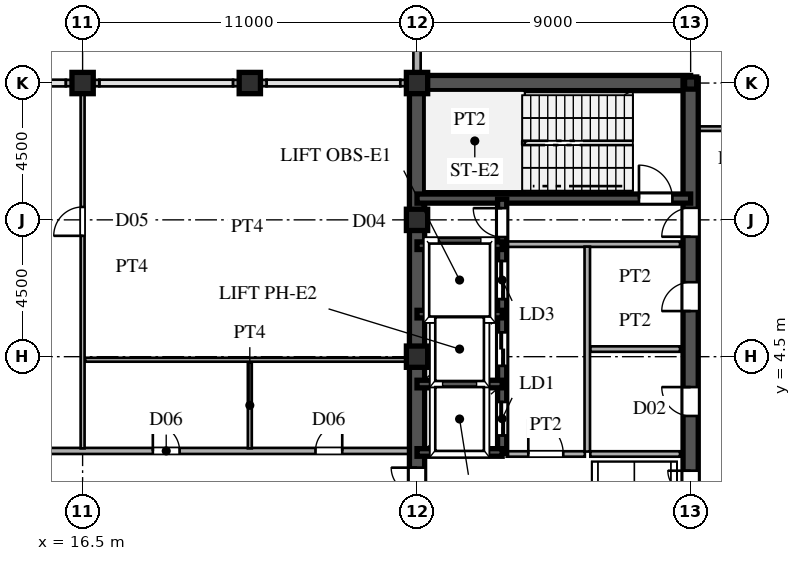
"""IFC4 building model, lengths in metres.
Left out: names, types, materials, properties, quantities, classifications, styles, units other than length and angle.
Written with IfcOpenShell. Run it as: python <this file> out.ifc"""

import sys

from ifc_helpers import new_model, si_unit, direction, frame, frame_2d, origin, origin_2d, place, context, subcontext, project, spatial, rectangle, hollow_rectangle, i_section, extrude, source, transform, mapped, element, fill, save


model = new_model("IFC4")
c1 = context("Model", 3, precision=1e-05, world=origin(), true_north=direction((0.0, 1.0)))
c2 = subcontext(c1, "Body", "Model", "MODEL_VIEW")
j1 = project(units=[si_unit("LENGTHUNIT", "METRE"), si_unit("PLANEANGLEUNIT", "RADIAN")], contexts=[c1])
p1 = place(None, origin())
s1 = spatial("IfcSite", under=j1, at=p1, CompositionType="ELEMENT")
p2 = place(p1, origin())
s2 = spatial("IfcBuilding", under=s1, at=p2, CompositionType="ELEMENT")
p3 = place(p2, frame((0.0, 0.0, 269.4)))
s3 = spatial("IfcBuildingStorey", under=s2, at=p3, CompositionType="ELEMENT", Elevation=269.4)
m1 = source(origin(), c2, "Body", "SweptSolid", [
    extrude(hollow_rectangle(XDim=0.7, YDim=0.7, WallThickness=0.03, at=origin_2d()), origin(), (0.0, 0.0, 1.0), 4.8),
])
for number, where, z_axis, x_axis in (
    (1, (27.5, 4.5, 0.0), (0.0, 0.0, 1.0), (1.0, 0.0, 0.0)),
    (2, (27.5, 9.0, 0.0), (0.0, 0.0, 1.0), (1.0, 0.0, 0.0)),
    (3, (27.5, 13.5, 0.0), (0.0, 0.0, 1.0), (1.0, 0.0, 0.0)),
):
    element("IfcColumn", number, at=place(p3, frame(where, z_axis=z_axis, x_axis=x_axis)), inside=s3, PredefinedType="COLUMN", context=c2, shape_type="MappedRepresentation", body=[
        mapped(m1, transform((0.0, 0.0, 0.0), scale=1.0)),
    ])
m2 = source(origin(), c2, "Body", "SweptSolid", [
    extrude(i_section(OverallWidth=0.4, OverallDepth=0.4, WebThickness=0.013, FlangeThickness=0.021, at=origin_2d()), origin(), (0.0, 0.0, 1.0), 4.8),
])
p4 = place(p3, frame((36.5, 13.5, 0.0), z_axis=(0.0, 0.0, 1.0), x_axis=(1.0, 0.0, 0.0)))
e4 = element("IfcColumn", 4, at=p4, inside=s3, PredefinedType="COLUMN", context=c2, shape_type="MappedRepresentation", body=[
    mapped(m2, transform((0.0, 0.0, 0.0), scale=1.0)),
])
for number, where, z_axis, x_axis in (
    (5, (16.5, 13.5, 0.0), (0.0, 0.0, 1.0), (1.0, 0.0, 0.0)),
    (6, (22.0, 13.5, 0.0), (0.0, 0.0, 1.0), (1.0, 0.0, 0.0)),
):
    element("IfcColumn", number, at=place(p3, frame(where, z_axis=z_axis, x_axis=x_axis)), inside=s3, PredefinedType="COLUMN", context=c2, shape_type="MappedRepresentation", body=[
        mapped(m1, transform((0.0, 0.0, 0.0), scale=1.0)),
    ])
p5 = place(p3, frame((27.5, 13.755, 0.0), z_axis=(0.0, 0.0, 1.0), x_axis=(0.0, 1.0, 0.0)))
e7 = element("IfcWall", 7, at=p5, inside=s3, PredefinedType="SOLIDWALL", context=c2, shape_type="SweptSolid", body=[
    extrude(rectangle(XDim=0.62, YDim=0.24, at=frame_2d((0.31, 0.0))), origin(), (0.0, 0.0, 1.0), 4.04),
])
p6 = place(p3, frame((27.5, 14.375, 0.0), z_axis=(0.0, 0.0, 1.0), x_axis=(0.0, 1.0, 0.0)))
e8 = element("IfcWall", 8, at=p6, inside=s3, PredefinedType="SOLIDWALL", context=c2, shape_type="SweptSolid", body=[
    extrude(rectangle(XDim=1.605, YDim=0.24, at=frame_2d((0.803, 0.0))), origin(), (0.0, 0.0, 1.0), 4.54),
])
for number, where, z_axis, x_axis in (
    (9, (15.95, 13.5, 0.0), (0.0, 0.0, 1.0), (1.0, 0.0, 0.0)),
    (10, (21.45, 13.5, 0.0), (0.0, 0.0, 1.0), (1.0, 0.0, 0.0)),
):
    element("IfcWall", number, at=place(p3, frame(where, z_axis=z_axis, x_axis=x_axis)), inside=s3, PredefinedType="SOLIDWALL", context=c2, shape_type="SweptSolid", body=[
        extrude(rectangle(XDim=1.1, YDim=0.21, at=frame_2d((0.55, 0.0))), origin(), (0.0, 0.0, 1.0), 4.04),
    ])
p7 = place(p3, frame((26.95, 13.5, 0.0), z_axis=(0.0, 0.0, 1.0), x_axis=(1.0, 0.0, 0.0)))
e11 = element("IfcWall", 11, at=p7, inside=s3, PredefinedType="SOLIDWALL", context=c2, shape_type="SweptSolid", body=[
    extrude(rectangle(XDim=0.54, YDim=0.21, at=frame_2d((0.27, 0.0))), origin(), (0.0, 0.0, 1.0), 4.04),
])
p8 = place(p3, frame((27.5, 1.3, 0.0), z_axis=(0.0, 0.0, 1.0), x_axis=(0.0, 1.0, 0.0)))
e12 = element("IfcWall", 12, at=p8, inside=s3, PredefinedType="SHEAR", context=c2, shape_type="SweptSolid", body=[
    extrude(rectangle(XDim=12.2, YDim=0.5, at=frame_2d((6.1, 0.0))), origin(), (0.0, 0.0, 1.0), 4.54),
])
p9 = place(p3, frame((27.5, -1.3, 0.0), z_axis=(0.0, 0.0, 1.0), x_axis=(0.0, 1.0, 0.0)))
e13 = element("IfcWall", 13, at=p9, inside=s3, PredefinedType="SHEAR", context=c2, shape_type="SweptSolid", body=[
    extrude(rectangle(XDim=2.6, YDim=0.5, at=frame_2d((1.3, 0.0))), origin(), (0.0, 0.0, 1.0), 4.54),
])
p10 = place(p9, frame((0.45, 0.0, 0.0)))
e14 = element("IfcOpeningElement", 14, at=p10, cuts=e13, PredefinedType="OPENING", context=c2, shape_type="SweptSolid", body=[
    extrude(rectangle(XDim=1.7, YDim=2.35, at=frame_2d((0.85, 1.175))), frame((0.0, 0.26, 0.0), z_axis=(0.0, -1.0, 0.0), x_axis=(1.0, 0.0, 0.0)), (0.0, 0.0, 1.0), 0.52),
])
p11 = place(p3, frame((27.5, 13.5, 0.0), z_axis=(0.0, 0.0, 1.0), x_axis=(1.0, 0.0, 0.0)))
e15 = element("IfcWall", 15, at=p11, inside=s3, PredefinedType="SHEAR", context=c2, shape_type="SweptSolid", body=[
    extrude(rectangle(XDim=9.0, YDim=0.5, at=frame_2d((4.5, 0.0))), origin(), (0.0, 0.0, 1.0), 4.54),
])
p12 = place(p3, frame((36.5, -1.3, 0.0), z_axis=(0.0, 0.0, 1.0), x_axis=(0.0, 1.0, 0.0)))
e16 = element("IfcWall", 16, at=p12, inside=s3, PredefinedType="SHEAR", context=c2, shape_type="SweptSolid", body=[
    extrude(rectangle(XDim=2.6, YDim=0.5, at=frame_2d((1.3, 0.0))), origin(), (0.0, 0.0, 1.0), 4.54),
])
p13 = place(p12, frame((0.55, 0.0, 0.0)))
e17 = element("IfcOpeningElement", 17, at=p13, cuts=e16, PredefinedType="OPENING", context=c2, shape_type="SweptSolid", body=[
    extrude(rectangle(XDim=1.5, YDim=2.3, at=frame_2d((0.75, 1.15))), frame((0.0, 0.26, 0.0), z_axis=(0.0, -1.0, 0.0), x_axis=(1.0, 0.0, 0.0)), (0.0, 0.0, 1.0), 0.52),
])
p14 = place(p3, frame((36.5, 8.2, 0.0), z_axis=(0.0, 0.0, 1.0), x_axis=(0.0, 1.0, 0.0)))
e18 = element("IfcWall", 18, at=p14, inside=s3, PredefinedType="SHEAR", context=c2, shape_type="SweptSolid", body=[
    extrude(rectangle(XDim=5.45, YDim=0.5, at=frame_2d((2.725, 0.0))), origin(), (0.0, 0.0, 1.0), 4.54),
])
p15 = place(p14, frame((0.245, 0.0, 0.0)))
e19 = element("IfcOpeningElement", 19, at=p15, cuts=e18, PredefinedType="OPENING", context=c2, shape_type="SweptSolid", body=[
    extrude(rectangle(XDim=0.95, YDim=2.15, at=frame_2d((0.475, 1.075))), frame((0.0, 0.26, 0.0), z_axis=(0.0, -1.0, 0.0), x_axis=(1.0, 0.0, 0.0)), (0.0, 0.0, 1.0), 0.52),
])
p16 = place(p3, frame((36.5, 1.3, 0.0), z_axis=(0.0, 0.0, 1.0), x_axis=(0.0, 1.0, 0.0)))
e20 = element("IfcWall", 20, at=p16, inside=s3, PredefinedType="SHEAR", context=c2, shape_type="SweptSolid", body=[
    extrude(rectangle(XDim=3.45, YDim=0.5, at=frame_2d((1.725, 0.0))), origin(), (0.0, 0.0, 1.0), 4.54),
])
p17 = place(p16, frame((1.25, 0.0, 0.0)))
e21 = element("IfcOpeningElement", 21, at=p17, cuts=e20, PredefinedType="OPENING", context=c2, shape_type="SweptSolid", body=[
    extrude(rectangle(XDim=0.95, YDim=2.15, at=frame_2d((0.475, 1.075))), frame((0.0, 0.26, 0.0), z_axis=(0.0, -1.0, 0.0), x_axis=(1.0, 0.0, 0.0)), (0.0, 0.0, 1.0), 0.52),
])
p18 = place(p3, frame((36.5, 4.75, 0.0), z_axis=(0.0, 0.0, 1.0), x_axis=(0.0, 1.0, 0.0)))
e22 = element("IfcWall", 22, at=p18, inside=s3, PredefinedType="SHEAR", context=c2, shape_type="SweptSolid", body=[
    extrude(rectangle(XDim=3.45, YDim=0.5, at=frame_2d((1.725, 0.0))), origin(), (0.0, 0.0, 1.0), 4.54),
])
p19 = place(p18, frame((1.25, 0.0, 0.0)))
e23 = element("IfcOpeningElement", 23, at=p19, cuts=e22, PredefinedType="OPENING", context=c2, shape_type="SweptSolid", body=[
    extrude(rectangle(XDim=0.95, YDim=2.15, at=frame_2d((0.475, 1.075))), frame((0.0, 0.26, 0.0), z_axis=(0.0, -1.0, 0.0), x_axis=(1.0, 0.0, 0.0)), (0.0, 0.0, 1.0), 0.52),
])
p20 = place(p3, frame((27.5, 9.7, 0.0), z_axis=(0.0, 0.0, 1.0), x_axis=(1.0, 0.0, 0.0)))
e24 = element("IfcWall", 24, at=p20, inside=s3, PredefinedType="SHEAR", context=c2, shape_type="SweptSolid", body=[
    extrude(rectangle(XDim=9.0, YDim=0.3, at=frame_2d((4.5, 0.0))), origin(), (0.0, 0.0, 1.0), 4.54),
])
p21 = place(p20, frame((7.3, 0.0, 0.0)))
e25 = element("IfcOpeningElement", 25, at=p21, cuts=e24, PredefinedType="OPENING", context=c2, shape_type="SweptSolid", body=[
    extrude(rectangle(XDim=1.1, YDim=2.2, at=frame_2d((0.55, 1.1))), frame((0.0, 0.16, 0.0), z_axis=(0.0, -1.0, 0.0), x_axis=(1.0, 0.0, 0.0)), (0.0, 0.0, 1.0), 0.32),
])
for number, where, z_axis, x_axis in (
    (26, (27.5, 1.35, 0.0), (0.0, 0.0, 1.0), (1.0, 0.0, 0.0)),
    (27, (27.5, 3.6, 0.0), (0.0, 0.0, 1.0), (1.0, 0.0, 0.0)),
    (28, (27.5, 5.9, 0.0), (0.0, 0.0, 1.0), (1.0, 0.0, 0.0)),
    (29, (27.5, 8.15, 0.0), (0.0, 0.0, 1.0), (1.0, 0.0, 0.0)),
):
    element("IfcWall", number, at=place(p3, frame(where, z_axis=z_axis, x_axis=x_axis)), inside=s3, PredefinedType="SHEAR", context=c2, shape_type="SweptSolid", body=[
        extrude(rectangle(XDim=2.8, YDim=0.25, at=frame_2d((1.4, 0.0))), origin(), (0.0, 0.0, 1.0), 4.54),
    ])
p22 = place(p3, frame((30.3, 1.32, 0.0), z_axis=(0.0, 0.0, 1.0), x_axis=(0.0, 1.0, 0.0)))
e30 = element("IfcWall", 30, at=p22, inside=s3, PredefinedType="SHEAR", context=c2, shape_type="SweptSolid", body=[
    extrude(rectangle(XDim=2.28, YDim=0.3, at=frame_2d((1.14, 0.0))), origin(), (0.0, 0.0, 1.0), 4.54),
])
p23 = place(p22, frame((0.59, 0.0, 0.0)))
e31 = element("IfcOpeningElement", 31, at=p23, cuts=e30, PredefinedType="OPENING", context=c2, shape_type="SweptSolid", body=[
    extrude(rectangle(XDim=1.1, YDim=2.2, at=frame_2d((0.55, 1.1))), frame((0.0, 0.16, 0.0), z_axis=(0.0, -1.0, 0.0), x_axis=(1.0, 0.0, 0.0)), (0.0, 0.0, 1.0), 0.32),
])
p24 = place(p3, frame((30.3, 3.6, 0.0), z_axis=(0.0, 0.0, 1.0), x_axis=(0.0, 1.0, 0.0)))
e32 = element("IfcWall", 32, at=p24, inside=s3, PredefinedType="SHEAR", context=c2, shape_type="SweptSolid", body=[
    extrude(rectangle(XDim=2.3, YDim=0.3, at=frame_2d((1.15, 0.0))), origin(), (0.0, 0.0, 1.0), 4.54),
])
p25 = place(p24, frame((0.6, 0.0, 0.0)))
e33 = element("IfcOpeningElement", 33, at=p25, cuts=e32, PredefinedType="OPENING", context=c2, shape_type="SweptSolid", body=[
    extrude(rectangle(XDim=1.1, YDim=2.2, at=frame_2d((0.55, 1.1))), frame((0.0, 0.16, 0.0), z_axis=(0.0, -1.0, 0.0), x_axis=(1.0, 0.0, 0.0)), (0.0, 0.0, 1.0), 0.32),
])
p26 = place(p3, frame((30.3, 5.9, 0.0), z_axis=(0.0, 0.0, 1.0), x_axis=(0.0, 1.0, 0.0)))
e34 = element("IfcWall", 34, at=p26, inside=s3, PredefinedType="SHEAR", context=c2, shape_type="SweptSolid", body=[
    extrude(rectangle(XDim=2.25, YDim=0.3, at=frame_2d((1.125, 0.0))), origin(), (0.0, 0.0, 1.0), 4.54),
])
p27 = place(p26, frame((0.495, 0.0, 0.0)))
e35 = element("IfcOpeningElement", 35, at=p27, cuts=e34, PredefinedType="OPENING", context=c2, shape_type="SweptSolid", body=[
    extrude(rectangle(XDim=1.25, YDim=2.3, at=frame_2d((0.625, 1.15))), frame((0.0, 0.16, 0.0), z_axis=(0.0, -1.0, 0.0), x_axis=(1.0, 0.0, 0.0)), (0.0, 0.0, 1.0), 0.32),
])
p28 = place(p3, frame((30.3, 8.15, 0.0), z_axis=(0.0, 0.0, 1.0), x_axis=(0.0, 1.0, 0.0)))
e36 = element("IfcWall", 36, at=p28, inside=s3, PredefinedType="SHEAR", context=c2, shape_type="SweptSolid", body=[
    extrude(rectangle(XDim=1.53, YDim=0.3, at=frame_2d((0.765, 0.0))), origin(), (0.0, 0.0, 1.0), 4.54),
])
p29 = place(p28, frame((0.285, 0.0, 0.0)))
e37 = element("IfcOpeningElement", 37, at=p29, cuts=e36, PredefinedType="OPENING", context=c2, shape_type="SweptSolid", body=[
    extrude(rectangle(XDim=0.95, YDim=2.15, at=frame_2d((0.475, 1.075))), frame((0.0, 0.16, 0.0), z_axis=(0.0, -1.0, 0.0), x_axis=(1.0, 0.0, 0.0)), (0.0, 0.0, 1.0), 0.32),
])
p30 = place(p3, frame((30.45, 8.2, 0.0), z_axis=(0.0, 0.0, 1.0), x_axis=(1.0, 0.0, 0.0)))
e38 = element("IfcWall", 38, at=p30, inside=s3, PredefinedType="PARTITIONING", context=c2, shape_type="SweptSolid", body=[
    extrude(rectangle(XDim=5.7, YDim=0.18, at=frame_2d((2.85, 0.0))), origin(), (0.0, 0.0, 1.0), 4.54),
])
p31 = place(p3, frame((33.1, 1.38, 0.0), z_axis=(0.0, 0.0, 1.0), x_axis=(0.0, 1.0, 0.0)))
e39 = element("IfcWall", 39, at=p31, inside=s3, PredefinedType="PARTITIONING", context=c2, shape_type="SweptSolid", body=[
    extrude(rectangle(XDim=6.74, YDim=0.18, at=frame_2d((3.37, 0.0))), origin(), (0.0, 0.0, 1.0), 4.54),
])
p32 = place(p3, frame((30.45, 1.3, 0.0), z_axis=(0.0, 0.0, 1.0), x_axis=(1.0, 0.0, 0.0)))
e40 = element("IfcWall", 40, at=p32, inside=s3, PredefinedType="PARTITIONING", context=c2, shape_type="SweptSolid", body=[
    extrude(rectangle(XDim=2.57, YDim=0.18, at=frame_2d((1.285, 0.0))), origin(), (0.0, 0.0, 1.0), 4.54),
])
p33 = place(p32, frame((0.71, 0.0, 0.0)))
e41 = element("IfcOpeningElement", 41, at=p33, cuts=e40, PredefinedType="OPENING", context=c2, shape_type="SweptSolid", body=[
    extrude(rectangle(XDim=1.15, YDim=2.2, at=frame_2d((0.575, 1.1))), frame((0.0, 0.1, 0.0), z_axis=(0.0, -1.0, 0.0), x_axis=(1.0, 0.0, 0.0)), (0.0, 0.0, 1.0), 0.2),
])
for number, where, z_axis, x_axis in (
    (42, (33.2, 1.3, 0.0), (0.0, 0.0, 1.0), (1.0, 0.0, 0.0)),
    (43, (33.2, 4.75, 0.0), (0.0, 0.0, 1.0), (1.0, 0.0, 0.0)),
):
    element("IfcWall", number, at=place(p3, frame(where, z_axis=z_axis, x_axis=x_axis)), inside=s3, PredefinedType="PARTITIONING", context=c2, shape_type="SweptSolid", body=[
        extrude(rectangle(XDim=2.95, YDim=0.18, at=frame_2d((1.475, 0.0))), origin(), (0.0, 0.0, 1.0), 4.54),
    ])
p34 = place(p3, frame((-27.245, 1.4, 0.0), z_axis=(0.0, 0.0, 1.0), x_axis=(1.0, 0.0, 0.0)))
e44 = element("IfcWall", 44, at=p34, inside=s3, PredefinedType="PARTITIONING", context=c2, shape_type="SweptSolid", body=[
    extrude(rectangle(XDim=54.49, YDim=0.2, at=frame_2d((27.245, 0.0))), origin(), (0.0, 0.0, 1.0), 4.54),
])
p35 = place(p34, frame((17.67, 0.0, 0.0)))
e45 = element("IfcOpeningElement", 45, at=p35, cuts=e44, PredefinedType="OPENING", context=c2, shape_type="SweptSolid", body=[
    extrude(rectangle(XDim=1.15, YDim=2.2, at=frame_2d((0.575, 1.1))), frame((0.0, 0.11, 0.0), z_axis=(0.0, -1.0, 0.0), x_axis=(1.0, 0.0, 0.0)), (0.0, 0.0, 1.0), 0.22),
])
p36 = place(p34, frame((46.055, 0.0, 0.0)))
e46 = element("IfcOpeningElement", 46, at=p36, cuts=e44, PredefinedType="OPENING", context=c2, shape_type="SweptSolid", body=[
    extrude(rectangle(XDim=0.88, YDim=2.1, at=frame_2d((0.44, 1.05))), frame((0.0, 0.11, 0.0), z_axis=(0.0, -1.0, 0.0), x_axis=(1.0, 0.0, 0.0)), (0.0, 0.0, 1.0), 0.22),
])
p37 = place(p34, frame((51.405, 0.0, 0.0)))
e47 = element("IfcOpeningElement", 47, at=p37, cuts=e44, PredefinedType="OPENING", context=c2, shape_type="SweptSolid", body=[
    extrude(rectangle(XDim=0.88, YDim=2.1, at=frame_2d((0.44, 1.05))), frame((0.0, 0.11, 0.0), z_axis=(0.0, -1.0, 0.0), x_axis=(1.0, 0.0, 0.0)), (0.0, 0.0, 1.0), 0.22),
])
p38 = place(p3, frame((16.585, 4.4, 0.0), z_axis=(0.0, 0.0, 1.0), x_axis=(1.0, 0.0, 0.0)))
e48 = element("IfcWall", 48, at=p38, inside=s3, PredefinedType="PARTITIONING", context=c2, shape_type="SweptSolid", body=[
    extrude(rectangle(XDim=10.66, YDim=0.13, at=frame_2d((5.33, 0.0))), origin(), (0.0, 0.0, 1.0), 4.54),
])
p39 = place(p3, frame((36.755, 12.0, 0.0), z_axis=(0.0, 0.0, 1.0), x_axis=(1.0, 0.0, 0.0)))
e49 = element("IfcWall", 49, at=p39, inside=s3, PredefinedType="PARTITIONING", context=c2, shape_type="SweptSolid", body=[
    extrude(rectangle(XDim=2.36, YDim=0.15, at=frame_2d((1.18, 0.0))), origin(), (0.0, 0.0, 1.0), 4.54),
])
p40 = place(p3, frame((16.5, 1.485, 0.0), z_axis=(0.0, 0.0, 1.0), x_axis=(0.0, 1.0, 0.0)))
e50 = element("IfcWall", 50, at=p40, inside=s3, PredefinedType="PARTITIONING", context=c2, shape_type="SweptSolid", body=[
    extrude(rectangle(XDim=11.905, YDim=0.13, at=frame_2d((5.952, 0.0))), origin(), (0.0, 0.0, 1.0), 3.24),
])
p41 = place(p40, frame((6.99, 0.0, 0.0)))
e51 = element("IfcOpeningElement", 51, at=p41, cuts=e50, PredefinedType="OPENING", context=c2, shape_type="SweptSolid", body=[
    extrude(rectangle(XDim=0.95, YDim=2.15, at=frame_2d((0.475, 1.075))), frame((0.0, 0.075, 0.0), z_axis=(0.0, -1.0, 0.0), x_axis=(1.0, 0.0, 0.0)), (0.0, 0.0, 1.0), 0.15),
])
p42 = place(p3, frame((22.0, 1.485, 0.0), z_axis=(0.0, 0.0, 1.0), x_axis=(0.0, 1.0, 0.0)))
e52 = element("IfcWall", 52, at=p42, inside=s3, PredefinedType="PARTITIONING", context=c2, shape_type="SweptSolid", body=[
    extrude(rectangle(XDim=2.83, YDim=0.13, at=frame_2d((1.415, 0.0))), origin(), (0.0, 0.0, 1.0), 3.24),
])
m3 = source(origin(), c2, "Body", "SweptSolid", [
    extrude(rectangle(XDim=1.7, YDim=2.35, at=frame_2d((0.85, 1.175))), frame((0.0, 0.025, 0.0), z_axis=(0.0, -1.0, 0.0), x_axis=(1.0, 0.0, 0.0)), (0.0, 0.0, 1.0), 0.05),
])
p43 = place(p10, origin())
e53 = element("IfcDoor", 53, at=p43, inside=s3, OperationType="DOUBLE_SWING_LEFT", PredefinedType="DOOR", context=c2, shape_type="MappedRepresentation", body=[
    mapped(m3, transform((0.0, 0.0, 0.0), scale=1.0)),
])
fill(e14, e53)
m4 = source(origin(), c2, "Body", "SweptSolid", [
    extrude(rectangle(XDim=1.5, YDim=2.3, at=frame_2d((0.75, 1.15))), frame((0.0, 0.025, 0.0), z_axis=(0.0, -1.0, 0.0), x_axis=(1.0, 0.0, 0.0)), (0.0, 0.0, 1.0), 0.05),
])
p44 = place(p13, origin())
e54 = element("IfcDoor", 54, at=p44, inside=s3, OperationType="DOUBLE_SWING_LEFT", PredefinedType="DOOR", context=c2, shape_type="MappedRepresentation", body=[
    mapped(m4, transform((0.0, 0.0, 0.0), scale=1.0)),
])
fill(e17, e54)
m5 = source(origin(), c2, "Body", "SweptSolid", [
    extrude(rectangle(XDim=0.95, YDim=2.15, at=frame_2d((0.475, 1.075))), frame((0.0, 0.025, 0.0), z_axis=(0.0, -1.0, 0.0), x_axis=(1.0, 0.0, 0.0)), (0.0, 0.0, 1.0), 0.05),
])
p45 = place(p15, origin())
e55 = element("IfcDoor", 55, at=p45, inside=s3, OperationType="SINGLE_SWING_LEFT", PredefinedType="DOOR", context=c2, shape_type="MappedRepresentation", body=[
    mapped(m5, transform((0.0, 0.0, 0.0), scale=1.0)),
])
fill(e19, e55)
p46 = place(p17, origin())
e56 = element("IfcDoor", 56, at=p46, inside=s3, OperationType="SINGLE_SWING_RIGHT", PredefinedType="DOOR", context=c2, shape_type="MappedRepresentation", body=[
    mapped(m5, transform((0.0, 0.0, 0.0), scale=1.0)),
])
fill(e21, e56)
p47 = place(p19, origin())
e57 = element("IfcDoor", 57, at=p47, inside=s3, OperationType="SINGLE_SWING_LEFT", PredefinedType="DOOR", context=c2, shape_type="MappedRepresentation", body=[
    mapped(m5, transform((0.0, 0.0, 0.0), scale=1.0)),
])
fill(e23, e57)
m6 = source(origin(), c2, "Body", "SweptSolid", [
    extrude(rectangle(XDim=1.1, YDim=2.2, at=frame_2d((0.55, 1.1))), frame((0.0, 0.025, 0.0), z_axis=(0.0, -1.0, 0.0), x_axis=(1.0, 0.0, 0.0)), (0.0, 0.0, 1.0), 0.05),
])
p48 = place(p21, origin())
e58 = element("IfcDoor", 58, at=p48, inside=s3, OperationType="SINGLE_SWING_LEFT", PredefinedType="DOOR", context=c2, shape_type="MappedRepresentation", body=[
    mapped(m6, transform((0.0, 0.0, 0.0), scale=1.0)),
])
fill(e25, e58)
m7 = source(origin(), c2, "Body", "SweptSolid", [
    extrude(rectangle(XDim=1.1, YDim=2.2, at=frame_2d((0.55, 1.1))), frame((0.0, 0.025, 0.0), z_axis=(0.0, -1.0, 0.0), x_axis=(1.0, 0.0, 0.0)), (0.0, 0.0, 1.0), 0.05),
])
p49 = place(p23, origin())
e59 = element("IfcDoor", 59, at=p49, inside=s3, OperationType="DOUBLE_DOOR_SLIDING", PredefinedType="DOOR", context=c2, shape_type="MappedRepresentation", body=[
    mapped(m7, transform((0.0, 0.0, 0.0), scale=1.0)),
])
fill(e31, e59)
p50 = place(p25, origin())
e60 = element("IfcDoor", 60, at=p50, inside=s3, OperationType="DOUBLE_DOOR_SLIDING", PredefinedType="DOOR", context=c2, shape_type="MappedRepresentation", body=[
    mapped(m7, transform((0.0, 0.0, 0.0), scale=1.0)),
])
fill(e33, e60)
m8 = source(origin(), c2, "Body", "SweptSolid", [
    extrude(rectangle(XDim=1.25, YDim=2.3, at=frame_2d((0.625, 1.15))), frame((0.0, 0.025, 0.0), z_axis=(0.0, -1.0, 0.0), x_axis=(1.0, 0.0, 0.0)), (0.0, 0.0, 1.0), 0.05),
])
p51 = place(p27, origin())
e61 = element("IfcDoor", 61, at=p51, inside=s3, OperationType="DOUBLE_DOOR_SLIDING", PredefinedType="DOOR", context=c2, shape_type="MappedRepresentation", body=[
    mapped(m8, transform((0.0, 0.0, 0.0), scale=1.0)),
])
fill(e35, e61)
p52 = place(p29, origin())
e62 = element("IfcDoor", 62, at=p52, inside=s3, OperationType="SINGLE_SWING_RIGHT", PredefinedType="DOOR", context=c2, shape_type="MappedRepresentation", body=[
    mapped(m5, transform((0.0, 0.0, 0.0), scale=1.0)),
])
fill(e37, e62)
m9 = source(origin(), c2, "Body", "SweptSolid", [
    extrude(rectangle(XDim=1.15, YDim=2.2, at=frame_2d((0.575, 1.1))), frame((0.0, 0.025, 0.0), z_axis=(0.0, -1.0, 0.0), x_axis=(1.0, 0.0, 0.0)), (0.0, 0.0, 1.0), 0.05),
])
p53 = place(p33, origin())
e63 = element("IfcDoor", 63, at=p53, inside=s3, OperationType="SINGLE_SWING_LEFT", PredefinedType="DOOR", context=c2, shape_type="MappedRepresentation", body=[
    mapped(m9, transform((0.0, 0.0, 0.0), scale=1.0)),
])
fill(e41, e63)
m10 = source(origin(), c2, "Body", "SweptSolid", [
    extrude(rectangle(XDim=0.88, YDim=2.1, at=frame_2d((0.44, 1.05))), frame((0.0, 0.025, 0.0), z_axis=(0.0, -1.0, 0.0), x_axis=(1.0, 0.0, 0.0)), (0.0, 0.0, 1.0), 0.05),
])
p54 = place(p36, origin())
e64 = element("IfcDoor", 64, at=p54, inside=s3, OperationType="SINGLE_SWING_LEFT", PredefinedType="DOOR", context=c2, shape_type="MappedRepresentation", body=[
    mapped(m10, transform((0.0, 0.0, 0.0), scale=1.0)),
])
fill(e46, e64)
p55 = place(p37, origin())
e65 = element("IfcDoor", 65, at=p55, inside=s3, OperationType="SINGLE_SWING_RIGHT", PredefinedType="DOOR", context=c2, shape_type="MappedRepresentation", body=[
    mapped(m10, transform((0.0, 0.0, 0.0), scale=1.0)),
])
fill(e47, e65)
m11 = source(origin(), c2, "Body", "SweptSolid", [
    extrude(rectangle(XDim=0.95, YDim=2.15, at=frame_2d((0.475, 1.075))), frame((0.0, 0.025, 0.0), z_axis=(0.0, -1.0, 0.0), x_axis=(1.0, 0.0, 0.0)), (0.0, 0.0, 1.0), 0.05),
])
p56 = place(p41, origin())
e66 = element("IfcDoor", 66, at=p56, inside=s3, OperationType="SINGLE_SWING_LEFT", PredefinedType="DOOR", context=c2, shape_type="MappedRepresentation", body=[
    mapped(m11, transform((0.0, 0.0, 0.0), scale=1.0)),
])
fill(e51, e66)
save(model, sys.argv[1])
